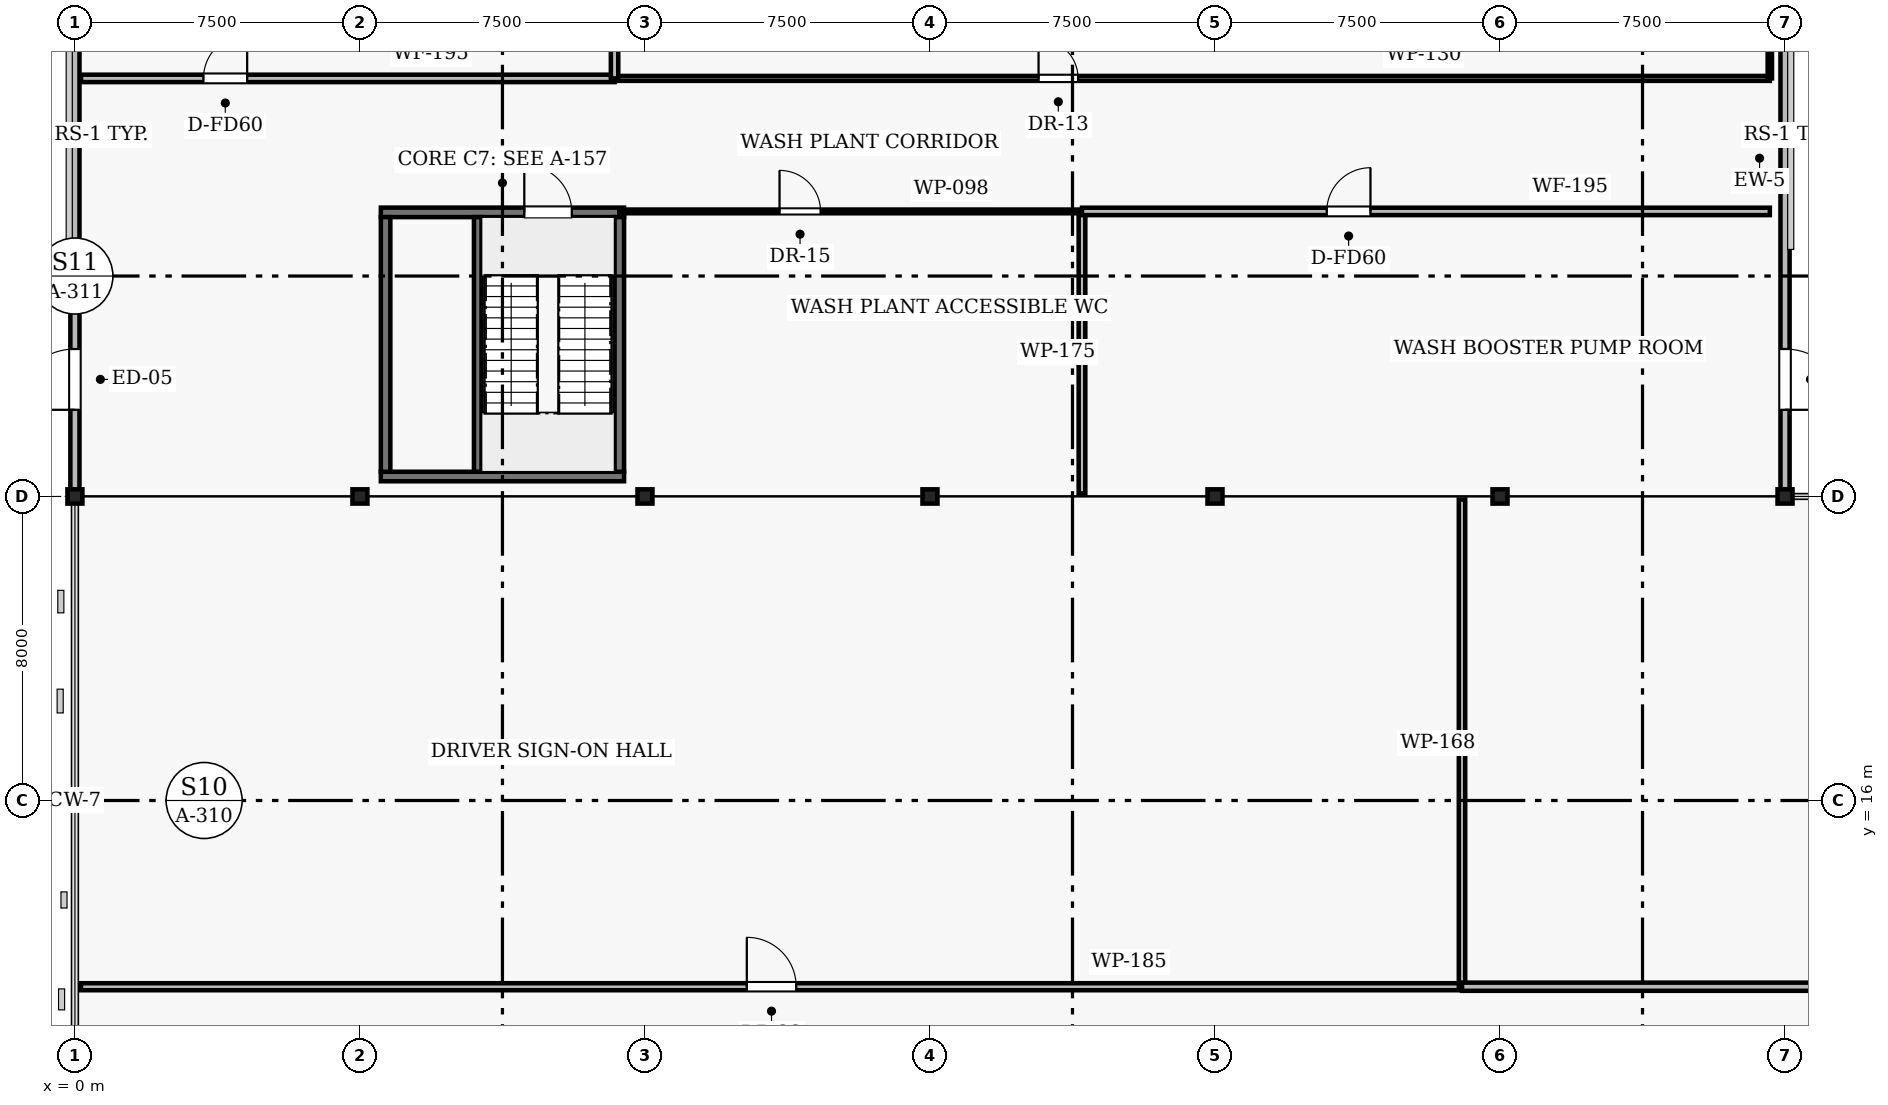
"""IFC4 building model, lengths in metres.
Left out: names, types, materials, properties, quantities, classifications, styles, units other than length and angle.
Written with IfcOpenShell. Run it as: python <this file> out.ifc"""

import sys

from ifc_helpers import new_model, si_unit, direction, frame, frame_2d, origin, origin_2d, place, context, subcontext, project, spatial, rectangle, i_section, extrude, element, fill, save


model = new_model("IFC4")
c1 = context("Model", 3, precision=1e-05, world=origin(), true_north=direction((0.0, 1.0)))
c2 = subcontext(c1, "Body", "Model", "MODEL_VIEW")
j1 = project(units=[si_unit("LENGTHUNIT", "METRE"), si_unit("PLANEANGLEUNIT", "RADIAN")], contexts=[c1])
p1 = place(None, origin())
s1 = spatial("IfcSite", under=j1, at=p1, CompositionType="ELEMENT")
p2 = place(p1, origin())
s2 = spatial("IfcBuilding", under=s1, at=p2, CompositionType="ELEMENT")
p3 = place(p2, origin())
s3 = spatial("IfcBuildingStorey", under=s2, at=p3, CompositionType="ELEMENT", Elevation=0.0)
for number, where, z_axis, x_axis in (
    (1, (0.0, 24.0, 0.0), (0.0, 0.0, 1.0), (1.0, 0.0, 0.0)),
    (2, (7.5, 24.0, 0.0), (0.0, 0.0, 1.0), (1.0, 0.0, 0.0)),
    (3, (15.0, 24.0, 0.0), (0.0, 0.0, 1.0), (1.0, 0.0, 0.0)),
    (4, (22.5, 24.0, 0.0), (0.0, 0.0, 1.0), (1.0, 0.0, 0.0)),
    (5, (30.0, 24.0, 0.0), (0.0, 0.0, 1.0), (1.0, 0.0, 0.0)),
    (6, (37.5, 24.0, 0.0), (0.0, 0.0, 1.0), (1.0, 0.0, 0.0)),
    (7, (45.0, 24.0, 0.0), (0.0, 0.0, 1.0), (1.0, 0.0, 0.0)),
):
    element("IfcColumn", number, at=place(p3, frame(where, z_axis=z_axis, x_axis=x_axis)), inside=s3, PredefinedType="COLUMN", context=c2, shape_type="SweptSolid", body=[
        extrude(i_section(OverallWidth=0.394, OverallDepth=0.375, WebThickness=0.021, FlangeThickness=0.033, FilletRadius=0.018, at=origin_2d()), origin(), (0.0, 0.0, 1.0), 4.5),
    ])
p4 = place(p3, frame((0.0, 24.08, 0.0), z_axis=(0.0, 0.0, 1.0), x_axis=(0.0, 1.0, 0.0)))
e8 = element("IfcWall", 8, at=p4, inside=s3, PredefinedType="SOLIDWALL", context=c2, shape_type="SweptSolid", body=[
    extrude(rectangle(XDim=13.84, YDim=0.24, at=frame_2d((6.92, 0.0))), origin(), (0.0, 0.0, 1.0), 3.633),
])
p5 = place(p4, frame((2.2, 0.0, 0.0)))
e9 = element("IfcOpeningElement", 9, at=p5, cuts=e8, PredefinedType="OPENING", context=c2, shape_type="SweptSolid", body=[
    extrude(rectangle(XDim=1.6, YDim=2.2, at=frame_2d((0.8, 1.1))), frame((0.0, 0.13, 0.0), z_axis=(0.0, -1.0, 0.0), x_axis=(1.0, 0.0, 0.0)), (0.0, 0.0, 1.0), 0.26),
])
p6 = place(p3, frame((45.0, 24.08, 0.0), z_axis=(0.0, 0.0, 1.0), x_axis=(0.0, 1.0, 0.0)))
e10 = element("IfcWall", 10, at=p6, inside=s3, PredefinedType="SOLIDWALL", context=c2, shape_type="SweptSolid", body=[
    extrude(rectangle(XDim=13.84, YDim=0.24, at=frame_2d((6.92, 0.0))), origin(), (0.0, 0.0, 1.0), 3.633),
])
p7 = place(p6, frame((2.2, 0.0, 0.0)))
e11 = element("IfcOpeningElement", 11, at=p7, cuts=e10, PredefinedType="OPENING", context=c2, shape_type="SweptSolid", body=[
    extrude(rectangle(XDim=1.6, YDim=2.2, at=frame_2d((0.8, 1.1))), frame((0.0, 0.13, 0.0), z_axis=(0.0, -1.0, 0.0), x_axis=(1.0, 0.0, 0.0)), (0.0, 0.0, 1.0), 0.26),
])
p8 = place(p3, frame((8.05, 24.525, 0.0), z_axis=(0.0, 0.0, 1.0), x_axis=(1.0, 0.0, 0.0)))
e12 = element("IfcWall", 12, at=p8, inside=s3, PredefinedType="SHEAR", context=c2, shape_type="SweptSolid", body=[
    extrude(rectangle(XDim=6.4, YDim=0.25, at=frame_2d((3.2, 0.0))), origin(), (0.0, 0.0, 1.0), 4.5),
])
p9 = place(p3, frame((8.05, 31.475, 0.0), z_axis=(0.0, 0.0, 1.0), x_axis=(1.0, 0.0, 0.0)))
e13 = element("IfcWall", 13, at=p9, inside=s3, PredefinedType="SHEAR", context=c2, shape_type="SweptSolid", body=[
    extrude(rectangle(XDim=6.4, YDim=0.25, at=frame_2d((3.2, 0.0))), origin(), (0.0, 0.0, 1.0), 4.5),
])
p10 = place(p9, frame((3.775, 0.0, 0.0)))
e14 = element("IfcOpeningElement", 14, at=p10, cuts=e13, PredefinedType="OPENING", context=c2, shape_type="SweptSolid", body=[
    extrude(rectangle(XDim=1.25, YDim=2.15, at=frame_2d((0.625, 1.075))), frame((0.0, 0.135, 0.0), z_axis=(0.0, -1.0, 0.0), x_axis=(1.0, 0.0, 0.0)), (0.0, 0.0, 1.0), 0.27),
])
for number, where, z_axis, x_axis in (
    (15, (8.175, 24.65, 0.0), (0.0, 0.0, 1.0), (0.0, 1.0, 0.0)),
    (16, (14.325, 24.65, 0.0), (0.0, 0.0, 1.0), (0.0, 1.0, 0.0)),
):
    element("IfcWall", number, at=place(p3, frame(where, z_axis=z_axis, x_axis=x_axis)), inside=s3, PredefinedType="SHEAR", context=c2, shape_type="SweptSolid", body=[
        extrude(rectangle(XDim=6.7, YDim=0.25, at=frame_2d((3.35, 0.0))), origin(), (0.0, 0.0, 1.0), 4.5),
    ])
p11 = place(p3, frame((10.6, 24.65, 0.0), z_axis=(0.0, 0.0, 1.0), x_axis=(0.0, 1.0, 0.0)))
e17 = element("IfcWall", 17, at=p11, inside=s3, PredefinedType="SHEAR", context=c2, shape_type="SweptSolid", body=[
    extrude(rectangle(XDim=6.7, YDim=0.2, at=frame_2d((3.35, 0.0))), origin(), (0.0, 0.0, 1.0), 4.5),
])
p12 = place(p3, frame((14.2, 35.0, 0.0), z_axis=(0.0, 0.0, 1.0), x_axis=(1.0, 0.0, 0.0)))
e18 = element("IfcWall", 18, at=p12, inside=s3, PredefinedType="PARTITIONING", context=c2, shape_type="SweptSolid", body=[
    extrude(rectangle(XDim=30.4, YDim=0.13, at=frame_2d((15.2, 0.0))), origin(), (0.0, 0.0, 1.0), 3.7),
])
p13 = place(p12, frame((11.157, 0.0, 0.0)))
e19 = element("IfcOpeningElement", 19, at=p13, cuts=e18, PredefinedType="OPENING", context=c2, shape_type="SweptSolid", body=[
    extrude(rectangle(XDim=1.04, YDim=2.15, at=frame_2d((0.52, 1.075))), frame((0.0, 0.075, 0.0), z_axis=(0.0, -1.0, 0.0), x_axis=(1.0, 0.0, 0.0)), (0.0, 0.0, 1.0), 0.15),
])
p14 = place(p3, frame((44.6, 35.0, 0.0), z_axis=(0.0, 0.0, 1.0), x_axis=(0.0, 1.0, 0.0)))
e20 = element("IfcWall", 20, at=p14, inside=s3, PredefinedType="PARTITIONING", context=c2, shape_type="SweptSolid", body=[
    extrude(rectangle(XDim=12.5, YDim=0.114, at=frame_2d((6.25, 0.0))), origin(), (0.0, 0.0, 1.0), 3.633),
])
p15 = place(p3, frame((0.16, 35.0, 0.0), z_axis=(0.0, 0.0, 1.0), x_axis=(1.0, 0.0, 0.0)))
e21 = element("IfcWall", 21, at=p15, inside=s3, PredefinedType="PARTITIONING", context=c2, shape_type="SweptSolid", body=[
    extrude(rectangle(XDim=14.04, YDim=0.195, at=frame_2d((7.02, 0.0))), origin(), (0.0, 0.0, 1.0), 3.7),
])
p16 = place(p15, frame((3.222, 0.0, 0.0)))
e22 = element("IfcOpeningElement", 22, at=p16, cuts=e21, PredefinedType="OPENING", context=c2, shape_type="SweptSolid", body=[
    extrude(rectangle(XDim=1.15, YDim=2.15, at=frame_2d((0.575, 1.075))), frame((0.0, 0.107, 0.0), z_axis=(0.0, -1.0, 0.0), x_axis=(1.0, 0.0, 0.0)), (0.0, 0.0, 1.0), 0.215),
])
p17 = place(p3, frame((14.2, 35.0, 0.0), z_axis=(0.0, 0.0, 1.0), x_axis=(0.0, 1.0, 0.0)))
e23 = element("IfcWall", 23, at=p17, inside=s3, PredefinedType="PARTITIONING", context=c2, shape_type="SweptSolid", body=[
    extrude(rectangle(XDim=12.5, YDim=0.195, at=frame_2d((6.25, 0.0))), origin(), (0.0, 0.0, 1.0), 3.7),
])
p18 = place(p3, frame((14.325, 31.5, 0.0), z_axis=(0.0, 0.0, 1.0), x_axis=(1.0, 0.0, 0.0)))
e24 = element("IfcWall", 24, at=p18, inside=s3, PredefinedType="PARTITIONING", context=c2, shape_type="SweptSolid", body=[
    extrude(rectangle(XDim=12.175, YDim=0.098, at=frame_2d((6.087, 0.0))), origin(), (0.0, 0.0, 1.0), 3.7),
])
p19 = place(p18, frame((4.216, 0.0, 0.0)))
e25 = element("IfcOpeningElement", 25, at=p19, cuts=e24, PredefinedType="OPENING", context=c2, shape_type="SweptSolid", body=[
    extrude(rectangle(XDim=1.08, YDim=2.16, at=frame_2d((0.54, 1.08))), frame((0.0, 0.059, 0.0), z_axis=(0.0, -1.0, 0.0), x_axis=(1.0, 0.0, 0.0)), (0.0, 0.0, 1.0), 0.118),
])
p20 = place(p3, frame((26.5, 24.08, 0.0), z_axis=(0.0, 0.0, 1.0), x_axis=(0.0, 1.0, 0.0)))
e26 = element("IfcWall", 26, at=p20, inside=s3, PredefinedType="PARTITIONING", context=c2, shape_type="SweptSolid", body=[
    extrude(rectangle(XDim=7.42, YDim=0.175, at=frame_2d((3.71, 0.0))), origin(), (0.0, 0.0, 1.0), 3.7),
])
p21 = place(p3, frame((26.5, 31.5, 0.0), z_axis=(0.0, 0.0, 1.0), x_axis=(1.0, 0.0, 0.0)))
e27 = element("IfcWall", 27, at=p21, inside=s3, PredefinedType="PARTITIONING", context=c2, shape_type="SweptSolid", body=[
    extrude(rectangle(XDim=18.1, YDim=0.195, at=frame_2d((9.05, 0.0))), origin(), (0.0, 0.0, 1.0), 3.7),
])
p22 = place(p21, frame((6.441, 0.0, 0.0)))
e28 = element("IfcOpeningElement", 28, at=p22, cuts=e27, PredefinedType="OPENING", context=c2, shape_type="SweptSolid", body=[
    extrude(rectangle(XDim=1.15, YDim=2.15, at=frame_2d((0.575, 1.075))), frame((0.0, 0.107, 0.0), z_axis=(0.0, -1.0, 0.0), x_axis=(1.0, 0.0, 0.0)), (0.0, 0.0, 1.0), 0.215),
])
p23 = place(p3, frame((0.16, 11.1, 0.0), z_axis=(0.0, 0.0, 1.0), x_axis=(1.0, 0.0, 0.0)))
e29 = element("IfcWall", 29, at=p23, inside=s3, PredefinedType="PARTITIONING", context=c2, shape_type="SweptSolid", body=[
    extrude(rectangle(XDim=36.34, YDim=0.185, at=frame_2d((18.17, 0.0))), origin(), (0.0, 0.0, 1.0), 3.7),
])
p24 = place(p23, frame((17.52, 0.0, 0.0)))
e30 = element("IfcOpeningElement", 30, at=p24, cuts=e29, PredefinedType="OPENING", context=c2, shape_type="SweptSolid", body=[
    extrude(rectangle(XDim=1.3, YDim=2.14, at=frame_2d((0.65, 1.07))), frame((0.0, 0.103, 0.0), z_axis=(0.0, -1.0, 0.0), x_axis=(1.0, 0.0, 0.0)), (0.0, 0.0, 1.0), 0.205),
])
p25 = place(p3, frame((36.5, 11.1, 0.0), z_axis=(0.0, 0.0, 1.0), x_axis=(0.0, 1.0, 0.0)))
e31 = element("IfcWall", 31, at=p25, inside=s3, PredefinedType="PARTITIONING", context=c2, shape_type="SweptSolid", body=[
    extrude(rectangle(XDim=12.82, YDim=0.168, at=frame_2d((6.41, 0.0))), origin(), (0.0, 0.0, 1.0), 3.7),
])
p26 = place(p3, frame((36.5, 11.1, 0.0), z_axis=(0.0, 0.0, 1.0), x_axis=(1.0, 0.0, 0.0)))
e32 = element("IfcWall", 32, at=p26, inside=s3, PredefinedType="PARTITIONING", context=c2, shape_type="SweptSolid", body=[
    extrude(rectangle(XDim=31.0, YDim=0.215, at=frame_2d((15.5, 0.0))), origin(), (0.0, 0.0, 1.0), 3.7),
])
p27 = place(p26, frame((11.343, 0.0, 0.0)))
e33 = element("IfcOpeningElement", 33, at=p27, cuts=e32, PredefinedType="OPENING", context=c2, shape_type="SweptSolid", body=[
    extrude(rectangle(XDim=1.15, YDim=2.15, at=frame_2d((0.575, 1.075))), frame((0.0, 0.117, 0.0), z_axis=(0.0, -1.0, 0.0), x_axis=(1.0, 0.0, 0.0)), (0.0, 0.0, 1.0), 0.235),
])
p28 = place(p5, origin())
e34 = element("IfcDoor", 34, at=p28, inside=s3, OperationType="SINGLE_SWING_LEFT", PredefinedType="DOOR", context=c2, shape_type="SweptSolid", body=[
    extrude(rectangle(XDim=1.6, YDim=2.2, at=frame_2d((0.8, 1.1))), frame((0.0, 0.025, 0.0), z_axis=(0.0, -1.0, 0.0), x_axis=(1.0, 0.0, 0.0)), (0.0, 0.0, 1.0), 0.05),
])
fill(e9, e34)
p29 = place(p7, frame((1.6, 0.0, 0.0), z_axis=(0.0, 0.0, 1.0), x_axis=(-1.0, 0.0, 0.0)))
e35 = element("IfcDoor", 35, at=p29, inside=s3, OperationType="SINGLE_SWING_RIGHT", PredefinedType="DOOR", context=c2, shape_type="SweptSolid", body=[
    extrude(rectangle(XDim=1.6, YDim=2.2, at=frame_2d((0.8, 1.1))), frame((0.0, 0.025, 0.0), z_axis=(0.0, -1.0, 0.0), x_axis=(1.0, 0.0, 0.0)), (0.0, 0.0, 1.0), 0.05),
])
fill(e11, e35)
p30 = place(p10, origin())
e36 = element("IfcDoor", 36, at=p30, inside=s3, OperationType="SINGLE_SWING_LEFT", PredefinedType="DOOR", context=c2, shape_type="SweptSolid", body=[
    extrude(rectangle(XDim=1.25, YDim=2.15, at=frame_2d((0.625, 1.075))), frame((0.0, 0.025, 0.0), z_axis=(0.0, -1.0, 0.0), x_axis=(1.0, 0.0, 0.0)), (0.0, 0.0, 1.0), 0.05),
])
fill(e14, e36)
p31 = place(p13, origin())
e37 = element("IfcDoor", 37, at=p31, inside=s3, OperationType="SINGLE_SWING_LEFT", PredefinedType="DOOR", context=c2, shape_type="SweptSolid", body=[
    extrude(rectangle(XDim=1.04, YDim=2.15, at=frame_2d((0.52, 1.075))), frame((0.0, 0.025, 0.0), z_axis=(0.0, -1.0, 0.0), x_axis=(1.0, 0.0, 0.0)), (0.0, 0.0, 1.0), 0.05),
])
fill(e19, e37)
p32 = place(p16, origin())
e38 = element("IfcDoor", 38, at=p32, inside=s3, OperationType="SINGLE_SWING_RIGHT", PredefinedType="DOOR", context=c2, shape_type="SweptSolid", body=[
    extrude(rectangle(XDim=1.15, YDim=2.15, at=frame_2d((0.575, 1.075))), frame((0.0, 0.025, 0.0), z_axis=(0.0, -1.0, 0.0), x_axis=(1.0, 0.0, 0.0)), (0.0, 0.0, 1.0), 0.05),
])
fill(e22, e38)
p33 = place(p19, origin())
e39 = element("IfcDoor", 39, at=p33, inside=s3, OperationType="SINGLE_SWING_LEFT", PredefinedType="DOOR", context=c2, shape_type="SweptSolid", body=[
    extrude(rectangle(XDim=1.08, YDim=2.16, at=frame_2d((0.54, 1.08))), frame((0.0, 0.025, 0.0), z_axis=(0.0, -1.0, 0.0), x_axis=(1.0, 0.0, 0.0)), (0.0, 0.0, 1.0), 0.05),
])
fill(e25, e39)
p34 = place(p22, origin())
e40 = element("IfcDoor", 40, at=p34, inside=s3, OperationType="SINGLE_SWING_RIGHT", PredefinedType="DOOR", context=c2, shape_type="SweptSolid", body=[
    extrude(rectangle(XDim=1.15, YDim=2.15, at=frame_2d((0.575, 1.075))), frame((0.0, 0.025, 0.0), z_axis=(0.0, -1.0, 0.0), x_axis=(1.0, 0.0, 0.0)), (0.0, 0.0, 1.0), 0.05),
])
fill(e28, e40)
p35 = place(p24, origin())
e41 = element("IfcDoor", 41, at=p35, inside=s3, OperationType="SINGLE_SWING_LEFT", PredefinedType="DOOR", context=c2, shape_type="SweptSolid", body=[
    extrude(rectangle(XDim=1.3, YDim=2.14, at=frame_2d((0.65, 1.07))), frame((0.0, 0.025, 0.0), z_axis=(0.0, -1.0, 0.0), x_axis=(1.0, 0.0, 0.0)), (0.0, 0.0, 1.0), 0.05),
])
fill(e30, e41)
save(model, sys.argv[1])
